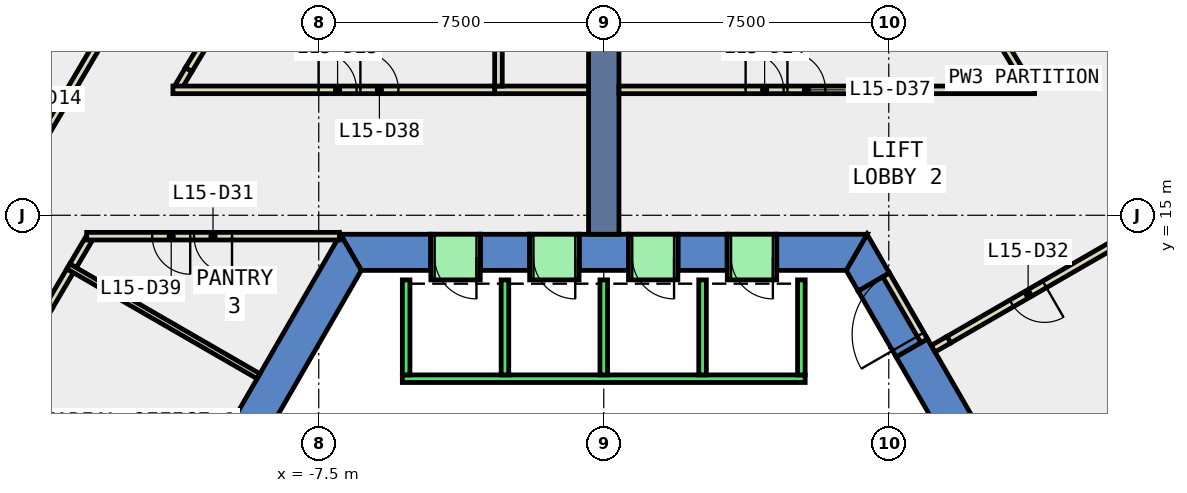
"""IFC4 building model, lengths in metres.
Left out: names, types, materials, properties, quantities, classifications, styles, units other than length and angle.
Written with IfcOpenShell. Run it as: python <this file> out.ifc"""

import sys

from ifc_helpers import new_model, si_unit, direction, frame, frame_2d, origin, place, context, subcontext, project, spatial, polyline, rectangle, outline, extrude, element, fill, save


model = new_model("IFC4")
c1 = context("Model", 3, precision=1e-05, world=origin(), true_north=direction((0.0, 1.0)))
c2 = subcontext(c1, "Body", "Model", "MODEL_VIEW")
j1 = project(units=[si_unit("LENGTHUNIT", "METRE"), si_unit("PLANEANGLEUNIT", "RADIAN")], contexts=[c1])
p1 = place(None, origin())
s1 = spatial("IfcSite", under=j1, at=p1, CompositionType="ELEMENT")
p2 = place(p1, origin())
s2 = spatial("IfcBuilding", under=s1, at=p2, CompositionType="ELEMENT")
p3 = place(p2, frame((0.0, 0.0, 72.8)))
s3 = spatial("IfcBuildingStorey", under=s2, at=p3, CompositionType="ELEMENT", Elevation=72.8)
p4 = place(p3, frame((0.0, 0.0, -0.4)))
e1 = element("IfcWall", 1, at=p4, inside=s3, PredefinedType="SHEAR", context=c2, shape_type="SweptSolid", body=[
    extrude(outline(polyline([(8.517, 11.748), (7.694, 11.273), (12.759, 2.5), (13.856, 2.5), (8.517, 11.748)])), origin(), (0.0, 0.0, 1.0), 4.2),
])
p5 = place(p3, frame((0.0, 0.0, -0.4)))
e2 = element("IfcWall", 2, at=p5, inside=s3, PredefinedType="SHEAR", context=c2, shape_type="SweptSolid", body=[
    extrude(outline(polyline([(6.695, 13.005), (7.517, 13.48), (6.928, 14.5), (6.38, 13.55), (6.695, 13.005)])), origin(), (0.0, 0.0, 1.0), 4.2),
])
p6 = place(p3, frame((0.0, 0.0, 3.6)))
e3 = element("IfcWall", 3, at=p6, inside=s3, PredefinedType="SHEAR", context=c2, shape_type="SweptSolid", body=[
    extrude(outline(polyline([(7.517, 13.48), (6.695, 13.005), (7.694, 11.273), (8.517, 11.748), (7.517, 13.48)])), origin(), (0.0, 0.0, 1.0), 0.2),
])
p7 = place(p3, frame((0.0, 0.0, -0.4)))
e4 = element("IfcWall", 4, at=p7, inside=s3, PredefinedType="SHEAR", context=c2, shape_type="SweptSolid", body=[
    extrude(outline(polyline([(4.55, 14.5), (4.55, 13.55), (6.38, 13.55), (6.928, 14.5), (4.55, 14.5)])), origin(), (0.0, 0.0, 1.0), 4.2),
])
p8 = place(p3, frame((0.0, 0.0, -0.4)))
e5 = element("IfcWall", 5, at=p8, inside=s3, PredefinedType="SHEAR", context=c2, shape_type="SweptSolid", body=[
    extrude(outline(polyline([(1.95, 14.5), (1.95, 13.55), (3.25, 13.55), (3.25, 14.5), (1.95, 14.5)])), origin(), (0.0, 0.0, 1.0), 4.2),
])
p9 = place(p3, frame((0.0, 0.0, -0.4)))
e6 = element("IfcWall", 6, at=p9, inside=s3, PredefinedType="SHEAR", context=c2, shape_type="SweptSolid", body=[
    extrude(outline(polyline([(-0.65, 14.5), (-0.65, 13.55), (0.65, 13.55), (0.65, 14.5), (-0.65, 14.5)])), origin(), (0.0, 0.0, 1.0), 4.2),
])
p10 = place(p3, frame((0.0, 0.0, -0.4)))
e7 = element("IfcWall", 7, at=p10, inside=s3, PredefinedType="SHEAR", context=c2, shape_type="SweptSolid", body=[
    extrude(outline(polyline([(-3.25, 14.5), (-3.25, 13.55), (-1.95, 13.55), (-1.95, 14.5), (-3.25, 14.5)])), origin(), (0.0, 0.0, 1.0), 4.2),
])
p11 = place(p3, frame((0.0, 0.0, -0.4)))
e8 = element("IfcWall", 8, at=p11, inside=s3, PredefinedType="SHEAR", context=c2, shape_type="SweptSolid", body=[
    extrude(outline(polyline([(-4.55, 13.55), (-4.55, 14.5), (-6.928, 14.5), (-6.38, 13.55), (-4.55, 13.55)])), origin(), (0.0, 0.0, 1.0), 4.2),
])
p12 = place(p3, frame((0.0, 0.0, 3.6)))
e9 = element("IfcWall", 9, at=p12, inside=s3, PredefinedType="SHEAR", context=c2, shape_type="SweptSolid", body=[
    extrude(outline(polyline([(3.25, 14.5), (3.25, 13.55), (4.55, 13.55), (4.55, 14.5), (3.25, 14.5)])), origin(), (0.0, 0.0, 1.0), 0.2),
])
p13 = place(p3, frame((0.0, 0.0, 3.6)))
e10 = element("IfcWall", 10, at=p13, inside=s3, PredefinedType="SHEAR", context=c2, shape_type="SweptSolid", body=[
    extrude(outline(polyline([(0.65, 14.5), (0.65, 13.55), (1.95, 13.55), (1.95, 14.5), (0.65, 14.5)])), origin(), (0.0, 0.0, 1.0), 0.2),
])
p14 = place(p3, frame((0.0, 0.0, 3.6)))
e11 = element("IfcWall", 11, at=p14, inside=s3, PredefinedType="SHEAR", context=c2, shape_type="SweptSolid", body=[
    extrude(outline(polyline([(-1.95, 14.5), (-1.95, 13.55), (-0.65, 13.55), (-0.65, 14.5), (-1.95, 14.5)])), origin(), (0.0, 0.0, 1.0), 0.2),
])
p15 = place(p3, frame((0.0, 0.0, 3.6)))
e12 = element("IfcWall", 12, at=p15, inside=s3, PredefinedType="SHEAR", context=c2, shape_type="SweptSolid", body=[
    extrude(outline(polyline([(-4.55, 14.5), (-4.55, 13.55), (-3.25, 13.55), (-3.25, 14.5), (-4.55, 14.5)])), origin(), (0.0, 0.0, 1.0), 0.2),
])
p16 = place(p3, frame((0.0, 0.0, -0.4)))
e13 = element("IfcWall", 13, at=p16, inside=s3, PredefinedType="SHEAR", context=c2, shape_type="SweptSolid", body=[
    extrude(outline(polyline([(-12.267, 5.252), (-11.444, 4.777), (-6.38, 13.55), (-6.928, 14.5), (-12.267, 5.252)])), origin(), (0.0, 0.0, 1.0), 4.2),
])
p17 = place(p3, frame((0.0, 14.5, -0.4), z_axis=(0.0, 0.0, 1.0), x_axis=(0.0, 1.0, 0.0)))
e14 = element("IfcWall", 14, at=p17, inside=s3, PredefinedType="SHEAR", context=c2, shape_type="SweptSolid", body=[
    extrude(rectangle(XDim=9.0, YDim=0.8, at=frame_2d((4.5, 0.0))), origin(), (0.0, 0.0, 1.0), 4.2),
])
p18 = place(p3, frame((-14.042, 13.541, 0.0), z_axis=(0.0, 0.0, 1.0), x_axis=(-0.507733830316, -0.861513991501, 0.0)))
e15 = element("IfcWall", 15, at=p18, inside=s3, PredefinedType="PARTITIONING", context=c2, shape_type="SweptSolid", body=[
    extrude(rectangle(XDim=1.091, YDim=0.2, at=frame_2d((0.545, 0.0))), origin(), (0.0, 0.0, 1.0), 3.8),
])
p19 = place(p3, frame((-13.557, 14.364, 0.0), z_axis=(0.0, 0.0, 1.0), x_axis=(-0.507840899418, -0.861450881292, 0.0)))
e16 = element("IfcWall", 16, at=p19, inside=s3, PredefinedType="PARTITIONING", context=c2, shape_type="SweptSolid", body=[
    extrude(rectangle(XDim=0.806, YDim=0.2, at=frame_2d((0.403, 0.0))), origin(), (0.0, 0.0, 1.0), 3.8),
])
p20 = place(p3, frame((13.667, 14.375, 0.0), z_axis=(0.0, 0.0, 1.0), x_axis=(-0.866016748302, -0.500014991436, 0.0)))
e17 = element("IfcWall", 17, at=p20, inside=s3, PredefinedType="PARTITIONING", context=c2, shape_type="SweptSolid", body=[
    extrude(rectangle(XDim=5.298, YDim=0.2, at=frame_2d((2.649, 0.0))), origin(), (0.0, 0.0, 1.0), 3.8),
])
p21 = place(p20, frame((2.387, 0.0, 0.0)))
e18 = element("IfcOpeningElement", 18, at=p21, cuts=e17, PredefinedType="OPENING", context=c2, shape_type="SweptSolid", body=[
    extrude(rectangle(XDim=1.0, YDim=2.1, at=frame_2d((0.5, 1.05))), frame((0.0, 0.11, 0.0), z_axis=(0.0, -1.0, 0.0), x_axis=(1.0, 0.0, 0.0)), (0.0, 0.0, 1.0), 0.22),
])
p22 = place(p3, frame((11.186, 18.386, 0.0), z_axis=(0.0, 0.0, 1.0), x_axis=(-0.507247363226, 0.861800506208, 0.0)))
e19 = element("IfcWall", 19, at=p22, inside=s3, PredefinedType="PARTITIONING", context=c2, shape_type="SweptSolid", body=[
    extrude(rectangle(XDim=0.516, YDim=0.2, at=frame_2d((0.258, 0.0))), origin(), (0.0, 0.0, 1.0), 3.8),
])
p23 = place(p3, frame((10.924, 18.831, 0.0), z_axis=(0.0, 0.0, 1.0), x_axis=(-0.515797941416, 0.856710268195, 0.0)))
e20 = element("IfcWall", 20, at=p23, inside=s3, PredefinedType="PARTITIONING", context=c2, shape_type="SweptSolid", body=[
    extrude(rectangle(XDim=6.283, YDim=0.2, at=frame_2d((3.142, 0.0))), origin(), (0.0, 0.0, 1.0), 3.8),
])
p24 = place(p3, frame((-7.58, 24.386, 0.0), z_axis=(0.0, 0.0, 1.0), x_axis=(-0.51574664882, -0.85674114774, 0.0)))
e21 = element("IfcWall", 21, at=p24, inside=s3, PredefinedType="PARTITIONING", context=c2, shape_type="SweptSolid", body=[
    extrude(rectangle(XDim=6.484, YDim=0.2, at=frame_2d((3.242, 0.0))), origin(), (0.0, 0.0, 1.0), 3.8),
])
p25 = place(p3, frame((-10.924, 18.831, 0.0), z_axis=(0.0, 0.0, 1.0), x_axis=(-0.507247363226, -0.861800506208, 0.0)))
e22 = element("IfcWall", 22, at=p25, inside=s3, PredefinedType="PARTITIONING", context=c2, shape_type="SweptSolid", body=[
    extrude(rectangle(XDim=0.516, YDim=0.2, at=frame_2d((0.258, 0.0))), origin(), (0.0, 0.0, 1.0), 3.8),
])
p26 = place(p3, frame((12.986, 20.059, 0.0), z_axis=(0.0, 0.0, 1.0), x_axis=(0.507876424268, -0.861429937762, 0.0)))
e23 = element("IfcWall", 23, at=p26, inside=s3, PredefinedType="PARTITIONING", context=c2, shape_type="SweptSolid", body=[
    extrude(rectangle(XDim=3.55, YDim=0.2, at=frame_2d((1.775, 0.0))), origin(), (0.0, 0.0, 1.0), 3.8),
])
p27 = place(p26, frame((1.275, 0.0, 0.0)))
e24 = element("IfcOpeningElement", 24, at=p27, cuts=e23, PredefinedType="OPENING", context=c2, shape_type="SweptSolid", body=[
    extrude(rectangle(XDim=1.0, YDim=2.1, at=frame_2d((0.5, 1.05))), frame((0.0, 0.11, 0.0), z_axis=(0.0, -1.0, 0.0), x_axis=(1.0, 0.0, 0.0)), (0.0, 0.0, 1.0), 0.22),
])
p28 = place(p3, frame((-16.669, 13.811, 0.0), z_axis=(0.0, 0.0, 1.0), x_axis=(0.507777955495, 0.861487984776, 0.0)))
e25 = element("IfcWall", 25, at=p28, inside=s3, PredefinedType="PARTITIONING", context=c2, shape_type="SweptSolid", body=[
    extrude(rectangle(XDim=7.178, YDim=0.2, at=frame_2d((3.589, 0.0))), origin(), (0.0, 0.0, 1.0), 3.8),
])
p29 = place(p28, frame((3.164, 0.0, 0.0)))
e26 = element("IfcOpeningElement", 26, at=p29, cuts=e25, PredefinedType="OPENING", context=c2, shape_type="SweptSolid", body=[
    extrude(rectangle(XDim=1.0, YDim=2.1, at=frame_2d((0.5, 1.05))), frame((0.0, 0.11, 0.0), z_axis=(0.0, -1.0, 0.0), x_axis=(1.0, 0.0, 0.0)), (0.0, 0.0, 1.0), 0.22),
])
p30 = place(p3, frame((-14.091, 13.655, 0.0), z_axis=(0.0, 0.0, 1.0), x_axis=(0.866035778077, -0.499982030767, 0.0)))
e27 = element("IfcWall", 27, at=p30, inside=s3, PredefinedType="PARTITIONING", context=c2, shape_type="SweptSolid", body=[
    extrude(rectangle(XDim=5.781, YDim=0.15, at=frame_2d((2.89, 0.0))), origin(), (0.0, 0.0, 1.0), 3.8),
])
p31 = place(p3, frame((-6.957, 14.45, 0.0), z_axis=(0.0, 0.0, 1.0), x_axis=(-1.0, 0.0, 0.0)))
e28 = element("IfcWall", 28, at=p31, inside=s3, PredefinedType="PARTITIONING", context=c2, shape_type="SweptSolid", body=[
    extrude(rectangle(XDim=6.649, YDim=0.2, at=frame_2d((3.324, 0.0))), origin(), (0.0, 0.0, 1.0), 3.8),
])
p32 = place(p31, frame((2.825, 0.0, 0.0)))
e29 = element("IfcOpeningElement", 29, at=p32, cuts=e28, PredefinedType="OPENING", context=c2, shape_type="SweptSolid", body=[
    extrude(rectangle(XDim=1.0, YDim=2.1, at=frame_2d((0.5, 1.05))), frame((0.0, 0.11, 0.0), z_axis=(0.0, -1.0, 0.0), x_axis=(1.0, 0.0, 0.0)), (0.0, 0.0, 1.0), 0.22),
])
p33 = place(p31, frame((3.925, 0.0, 0.0)))
e30 = element("IfcOpeningElement", 30, at=p33, cuts=e28, PredefinedType="OPENING", context=c2, shape_type="SweptSolid", body=[
    extrude(rectangle(XDim=1.0, YDim=2.1, at=frame_2d((0.5, 1.05))), frame((0.0, 0.11, 0.0), z_axis=(0.0, -1.0, 0.0), x_axis=(1.0, 0.0, 0.0)), (0.0, 0.0, 1.0), 0.22),
])
p34 = place(p3, frame((-2.871, 18.3, 0.0), z_axis=(0.0, 0.0, 1.0), x_axis=(1.0, 0.0, 0.0)))
e31 = element("IfcWall", 31, at=p34, inside=s3, PredefinedType="PARTITIONING", context=c2, shape_type="SweptSolid", body=[
    extrude(rectangle(XDim=2.471, YDim=0.2, at=frame_2d((1.236, 0.0))), origin(), (0.0, 0.0, 1.0), 3.8),
])
p35 = place(p3, frame((-11.337, 18.3, 0.0), z_axis=(0.0, 0.0, 1.0), x_axis=(1.0, 0.0, 0.0)))
e32 = element("IfcWall", 32, at=p35, inside=s3, PredefinedType="PARTITIONING", context=c2, shape_type="SweptSolid", body=[
    extrude(rectangle(XDim=8.466, YDim=0.2, at=frame_2d((4.233, 0.0))), origin(), (0.0, 0.0, 1.0), 3.8),
])
p36 = place(p35, frame((3.833, 0.0, 0.0)))
e33 = element("IfcOpeningElement", 33, at=p36, cuts=e32, PredefinedType="OPENING", context=c2, shape_type="SweptSolid", body=[
    extrude(rectangle(XDim=1.0, YDim=2.1, at=frame_2d((0.5, 1.05))), frame((0.0, 0.11, 0.0), z_axis=(0.0, -1.0, 0.0), x_axis=(1.0, 0.0, 0.0)), (0.0, 0.0, 1.0), 0.22),
])
p37 = place(p35, frame((4.933, 0.0, 0.0)))
e34 = element("IfcOpeningElement", 34, at=p37, cuts=e32, PredefinedType="OPENING", context=c2, shape_type="SweptSolid", body=[
    extrude(rectangle(XDim=1.0, YDim=2.1, at=frame_2d((0.5, 1.05))), frame((0.0, 0.11, 0.0), z_axis=(0.0, -1.0, 0.0), x_axis=(1.0, 0.0, 0.0)), (0.0, 0.0, 1.0), 0.22),
])
p38 = place(p3, frame((-2.771, 18.4, 0.0), z_axis=(0.0, 0.0, 1.0), x_axis=(0.0, 1.0, 0.0)))
e35 = element("IfcWall", 35, at=p38, inside=s3, PredefinedType="PARTITIONING", context=c2, shape_type="SweptSolid", body=[
    extrude(rectangle(XDim=6.0, YDim=0.2, at=frame_2d((3.0, 0.0))), origin(), (0.0, 0.0, 1.0), 3.8),
])
p39 = place(p3, frame((8.43, 11.698, 0.0), z_axis=(0.0, 0.0, 1.0), x_axis=(-0.50002537861, 0.866010750942, 0.0)))
e36 = element("IfcWall", 36, at=p39, inside=s3, PredefinedType="PARTITIONING", context=c2, shape_type="SweptSolid", body=[
    extrude(rectangle(XDim=2.0, YDim=0.2, at=frame_2d((1.0, 0.0))), origin(), (0.0, 0.0, 1.0), 2.4),
])
p40 = place(p39, frame((0.19, 0.0, 0.0)))
e37 = element("IfcOpeningElement", 37, at=p40, cuts=e36, PredefinedType="OPENING", context=c2, shape_type="SweptSolid", body=[
    extrude(rectangle(XDim=1.8, YDim=2.1, at=frame_2d((0.9, 1.05))), frame((0.0, 0.11, 0.0), z_axis=(0.0, -1.0, 0.0), x_axis=(1.0, 0.0, 0.0)), (0.0, 0.0, 1.0), 0.22),
])
p41 = place(p3, frame((0.4, 18.3, 0.0), z_axis=(0.0, 0.0, 1.0), x_axis=(1.0, 0.0, 0.0)))
e38 = element("IfcWall", 38, at=p41, inside=s3, PredefinedType="PARTITIONING", context=c2, shape_type="SweptSolid", body=[
    extrude(rectangle(XDim=10.937, YDim=0.2, at=frame_2d((5.469, 0.0))), origin(), (0.0, 0.0, 1.0), 3.8),
])
p42 = place(p41, frame((3.333, 0.0, 0.0)))
e39 = element("IfcOpeningElement", 39, at=p42, cuts=e38, PredefinedType="OPENING", context=c2, shape_type="SweptSolid", body=[
    extrude(rectangle(XDim=1.0, YDim=2.1, at=frame_2d((0.5, 1.05))), frame((0.0, 0.11, 0.0), z_axis=(0.0, -1.0, 0.0), x_axis=(1.0, 0.0, 0.0)), (0.0, 0.0, 1.0), 0.22),
])
p43 = place(p41, frame((4.433, 0.0, 0.0)))
e40 = element("IfcOpeningElement", 40, at=p43, cuts=e38, PredefinedType="OPENING", context=c2, shape_type="SweptSolid", body=[
    extrude(rectangle(XDim=1.0, YDim=2.1, at=frame_2d((0.5, 1.05))), frame((0.0, 0.11, 0.0), z_axis=(0.0, -1.0, 0.0), x_axis=(1.0, 0.0, 0.0)), (0.0, 0.0, 1.0), 0.22),
])
p44 = place(p3, frame((9.079, 11.726, 0.0), z_axis=(0.0, 0.0, 1.0), x_axis=(-0.865929261247, -0.500166486798, 0.0)))
e41 = element("IfcWall", 41, at=p44, inside=s3, PredefinedType="PARTITIONING", context=c2, shape_type="SweptSolid", body=[
    extrude(rectangle(XDim=0.476, YDim=0.2, at=frame_2d((0.238, 0.0))), origin(), (0.0, 0.0, 1.0), 2.4),
])
p45 = place(p3, frame((5.3, 10.7, 0.0), z_axis=(0.0, 0.0, 1.0), x_axis=(-1.0, 0.0, 0.0)))
e42 = element("IfcWall", 42, at=p45, inside=s3, PredefinedType="STANDARD", context=c2, shape_type="SweptSolid", body=[
    extrude(rectangle(XDim=10.6, YDim=0.2, at=frame_2d((5.3, 0.0))), origin(), (0.0, 0.0, 1.0), 3.8),
])
for number, where, z_axis, x_axis in (
    (43, (5.2, 10.8, 0.0), (0.0, 0.0, 1.0), (0.0, 1.0, 0.0)),
    (44, (2.6, 10.8, 0.0), (0.0, 0.0, 1.0), (0.0, 1.0, 0.0)),
    (45, (0.0, 10.8, 0.0), (0.0, 0.0, 1.0), (0.0, 1.0, 0.0)),
    (46, (-2.6, 10.8, 0.0), (0.0, 0.0, 1.0), (0.0, 1.0, 0.0)),
    (47, (-5.2, 10.8, 0.0), (0.0, 0.0, 1.0), (0.0, 1.0, 0.0)),
):
    element("IfcWall", number, at=place(p3, frame(where, z_axis=z_axis, x_axis=x_axis)), inside=s3, PredefinedType="STANDARD", context=c2, shape_type="SweptSolid", body=[
        extrude(rectangle(XDim=2.5, YDim=0.2, at=frame_2d((1.25, 0.0))), origin(), (0.0, 0.0, 1.0), 3.8),
    ])
p46 = place(p3, frame((4.55, 13.9, 0.0), z_axis=(0.0, 0.0, 1.0), x_axis=(-1.0, 0.0, 0.0)))
e48 = element("IfcWall", 48, at=p46, inside=s3, PredefinedType="STANDARD", context=c2, shape_type="SweptSolid", body=[
    extrude(rectangle(XDim=1.3, YDim=1.2, at=frame_2d((0.65, 0.0))), origin(), (0.0, 0.0, 1.0), 2.4),
])
p47 = place(p46, frame((0.1, 0.0, 0.0)))
e49 = element("IfcOpeningElement", 49, at=p47, cuts=e48, PredefinedType="OPENING", context=c2, shape_type="SweptSolid", body=[
    extrude(rectangle(XDim=1.1, YDim=2.3, at=frame_2d((0.55, 1.15))), frame((0.0, 0.61, 0.0), z_axis=(0.0, -1.0, 0.0), x_axis=(1.0, 0.0, 0.0)), (0.0, 0.0, 1.0), 1.22),
])
p48 = place(p3, frame((1.95, 13.9, 0.0), z_axis=(0.0, 0.0, 1.0), x_axis=(-1.0, 0.0, 0.0)))
e50 = element("IfcWall", 50, at=p48, inside=s3, PredefinedType="STANDARD", context=c2, shape_type="SweptSolid", body=[
    extrude(rectangle(XDim=1.3, YDim=1.2, at=frame_2d((0.65, 0.0))), origin(), (0.0, 0.0, 1.0), 2.4),
])
p49 = place(p48, frame((0.1, 0.0, 0.0)))
e51 = element("IfcOpeningElement", 51, at=p49, cuts=e50, PredefinedType="OPENING", context=c2, shape_type="SweptSolid", body=[
    extrude(rectangle(XDim=1.1, YDim=2.3, at=frame_2d((0.55, 1.15))), frame((0.0, 0.61, 0.0), z_axis=(0.0, -1.0, 0.0), x_axis=(1.0, 0.0, 0.0)), (0.0, 0.0, 1.0), 1.22),
])
p50 = place(p3, frame((-0.65, 13.9, 0.0), z_axis=(0.0, 0.0, 1.0), x_axis=(-1.0, 0.0, 0.0)))
e52 = element("IfcWall", 52, at=p50, inside=s3, PredefinedType="STANDARD", context=c2, shape_type="SweptSolid", body=[
    extrude(rectangle(XDim=1.3, YDim=1.2, at=frame_2d((0.65, 0.0))), origin(), (0.0, 0.0, 1.0), 2.4),
])
p51 = place(p50, frame((0.1, 0.0, 0.0)))
e53 = element("IfcOpeningElement", 53, at=p51, cuts=e52, PredefinedType="OPENING", context=c2, shape_type="SweptSolid", body=[
    extrude(rectangle(XDim=1.1, YDim=2.3, at=frame_2d((0.55, 1.15))), frame((0.0, 0.61, 0.0), z_axis=(0.0, -1.0, 0.0), x_axis=(1.0, 0.0, 0.0)), (0.0, 0.0, 1.0), 1.22),
])
p52 = place(p3, frame((-3.25, 13.9, 0.0), z_axis=(0.0, 0.0, 1.0), x_axis=(-1.0, 0.0, 0.0)))
e54 = element("IfcWall", 54, at=p52, inside=s3, PredefinedType="STANDARD", context=c2, shape_type="SweptSolid", body=[
    extrude(rectangle(XDim=1.3, YDim=1.2, at=frame_2d((0.65, 0.0))), origin(), (0.0, 0.0, 1.0), 2.4),
])
p53 = place(p52, frame((0.1, 0.0, 0.0)))
e55 = element("IfcOpeningElement", 55, at=p53, cuts=e54, PredefinedType="OPENING", context=c2, shape_type="SweptSolid", body=[
    extrude(rectangle(XDim=1.1, YDim=2.3, at=frame_2d((0.55, 1.15))), frame((0.0, 0.61, 0.0), z_axis=(0.0, -1.0, 0.0), x_axis=(1.0, 0.0, 0.0)), (0.0, 0.0, 1.0), 1.22),
])
p54 = place(p42, origin())
e56 = element("IfcDoor", 56, at=p54, inside=s3, OperationType="SINGLE_SWING_LEFT", PredefinedType="DOOR", context=c2, shape_type="SweptSolid", body=[
    extrude(rectangle(XDim=1.0, YDim=2.1, at=frame_2d((0.5, 1.05))), frame((0.0, 0.025, 0.0), z_axis=(0.0, -1.0, 0.0), x_axis=(1.0, 0.0, 0.0)), (0.0, 0.0, 1.0), 0.05),
])
fill(e39, e56)
p55 = place(p36, origin())
e57 = element("IfcDoor", 57, at=p55, inside=s3, OperationType="SINGLE_SWING_RIGHT", PredefinedType="DOOR", context=c2, shape_type="SweptSolid", body=[
    extrude(rectangle(XDim=1.0, YDim=2.1, at=frame_2d((0.5, 1.05))), frame((0.0, 0.025, 0.0), z_axis=(0.0, -1.0, 0.0), x_axis=(1.0, 0.0, 0.0)), (0.0, 0.0, 1.0), 0.05),
])
fill(e33, e57)
p56 = place(p32, origin())
e58 = element("IfcDoor", 58, at=p56, inside=s3, OperationType="SINGLE_SWING_LEFT", PredefinedType="DOOR", context=c2, shape_type="SweptSolid", body=[
    extrude(rectangle(XDim=1.0, YDim=2.1, at=frame_2d((0.5, 1.05))), frame((0.0, 0.025, 0.0), z_axis=(0.0, -1.0, 0.0), x_axis=(1.0, 0.0, 0.0)), (0.0, 0.0, 1.0), 0.05),
])
fill(e29, e58)
p57 = place(p21, origin())
e59 = element("IfcDoor", 59, at=p57, inside=s3, OperationType="SINGLE_SWING_LEFT", PredefinedType="DOOR", context=c2, shape_type="SweptSolid", body=[
    extrude(rectangle(XDim=1.0, YDim=2.1, at=frame_2d((0.5, 1.05))), frame((0.0, 0.025, 0.0), z_axis=(0.0, -1.0, 0.0), x_axis=(1.0, 0.0, 0.0)), (0.0, 0.0, 1.0), 0.05),
])
fill(e18, e59)
p58 = place(p43, origin())
e60 = element("IfcDoor", 60, at=p58, inside=s3, OperationType="SINGLE_SWING_RIGHT", PredefinedType="DOOR", context=c2, shape_type="SweptSolid", body=[
    extrude(rectangle(XDim=1.0, YDim=2.1, at=frame_2d((0.5, 1.05))), frame((0.0, 0.025, 0.0), z_axis=(0.0, -1.0, 0.0), x_axis=(1.0, 0.0, 0.0)), (0.0, 0.0, 1.0), 0.05),
])
fill(e40, e60)
p59 = place(p37, origin())
e61 = element("IfcDoor", 61, at=p59, inside=s3, OperationType="SINGLE_SWING_RIGHT", PredefinedType="DOOR", context=c2, shape_type="SweptSolid", body=[
    extrude(rectangle(XDim=1.0, YDim=2.1, at=frame_2d((0.5, 1.05))), frame((0.0, 0.025, 0.0), z_axis=(0.0, -1.0, 0.0), x_axis=(1.0, 0.0, 0.0)), (0.0, 0.0, 1.0), 0.05),
])
fill(e34, e61)
p60 = place(p33, origin())
e62 = element("IfcDoor", 62, at=p60, inside=s3, OperationType="SINGLE_SWING_RIGHT", PredefinedType="DOOR", context=c2, shape_type="SweptSolid", body=[
    extrude(rectangle(XDim=1.0, YDim=2.1, at=frame_2d((0.5, 1.05))), frame((0.0, 0.025, 0.0), z_axis=(0.0, -1.0, 0.0), x_axis=(1.0, 0.0, 0.0)), (0.0, 0.0, 1.0), 0.05),
])
fill(e30, e62)
p61 = place(p40, origin())
e63 = element("IfcDoor", 63, at=p61, inside=s3, OperationType="DOUBLE_DOOR_SINGLE_SWING", PredefinedType="DOOR", context=c2, shape_type="SweptSolid", body=[
    extrude(rectangle(XDim=1.8, YDim=2.1, at=frame_2d((0.9, 1.05))), frame((0.0, 0.025, 0.0), z_axis=(0.0, -1.0, 0.0), x_axis=(1.0, 0.0, 0.0)), (0.0, 0.0, 1.0), 0.05),
])
fill(e37, e63)
p62 = place(p47, origin())
e64 = element("IfcDoor", 64, at=p62, inside=s3, OperationType="SLIDING_TO_LEFT", PredefinedType="DOOR", context=c2, shape_type="SweptSolid", body=[
    extrude(rectangle(XDim=1.1, YDim=2.3, at=frame_2d((0.55, 1.15))), frame((0.0, 0.025, 0.0), z_axis=(0.0, -1.0, 0.0), x_axis=(1.0, 0.0, 0.0)), (0.0, 0.0, 1.0), 0.05),
])
fill(e49, e64)
p63 = place(p49, origin())
e65 = element("IfcDoor", 65, at=p63, inside=s3, OperationType="SLIDING_TO_LEFT", PredefinedType="DOOR", context=c2, shape_type="SweptSolid", body=[
    extrude(rectangle(XDim=1.1, YDim=2.3, at=frame_2d((0.55, 1.15))), frame((0.0, 0.025, 0.0), z_axis=(0.0, -1.0, 0.0), x_axis=(1.0, 0.0, 0.0)), (0.0, 0.0, 1.0), 0.05),
])
fill(e51, e65)
p64 = place(p51, origin())
e66 = element("IfcDoor", 66, at=p64, inside=s3, OperationType="SLIDING_TO_LEFT", PredefinedType="DOOR", context=c2, shape_type="SweptSolid", body=[
    extrude(rectangle(XDim=1.1, YDim=2.3, at=frame_2d((0.55, 1.15))), frame((0.0, 0.025, 0.0), z_axis=(0.0, -1.0, 0.0), x_axis=(1.0, 0.0, 0.0)), (0.0, 0.0, 1.0), 0.05),
])
fill(e53, e66)
p65 = place(p53, origin())
e67 = element("IfcDoor", 67, at=p65, inside=s3, OperationType="SLIDING_TO_LEFT", PredefinedType="DOOR", context=c2, shape_type="SweptSolid", body=[
    extrude(rectangle(XDim=1.1, YDim=2.3, at=frame_2d((0.55, 1.15))), frame((0.0, 0.025, 0.0), z_axis=(0.0, -1.0, 0.0), x_axis=(1.0, 0.0, 0.0)), (0.0, 0.0, 1.0), 0.05),
])
fill(e55, e67)
save(model, sys.argv[1])
